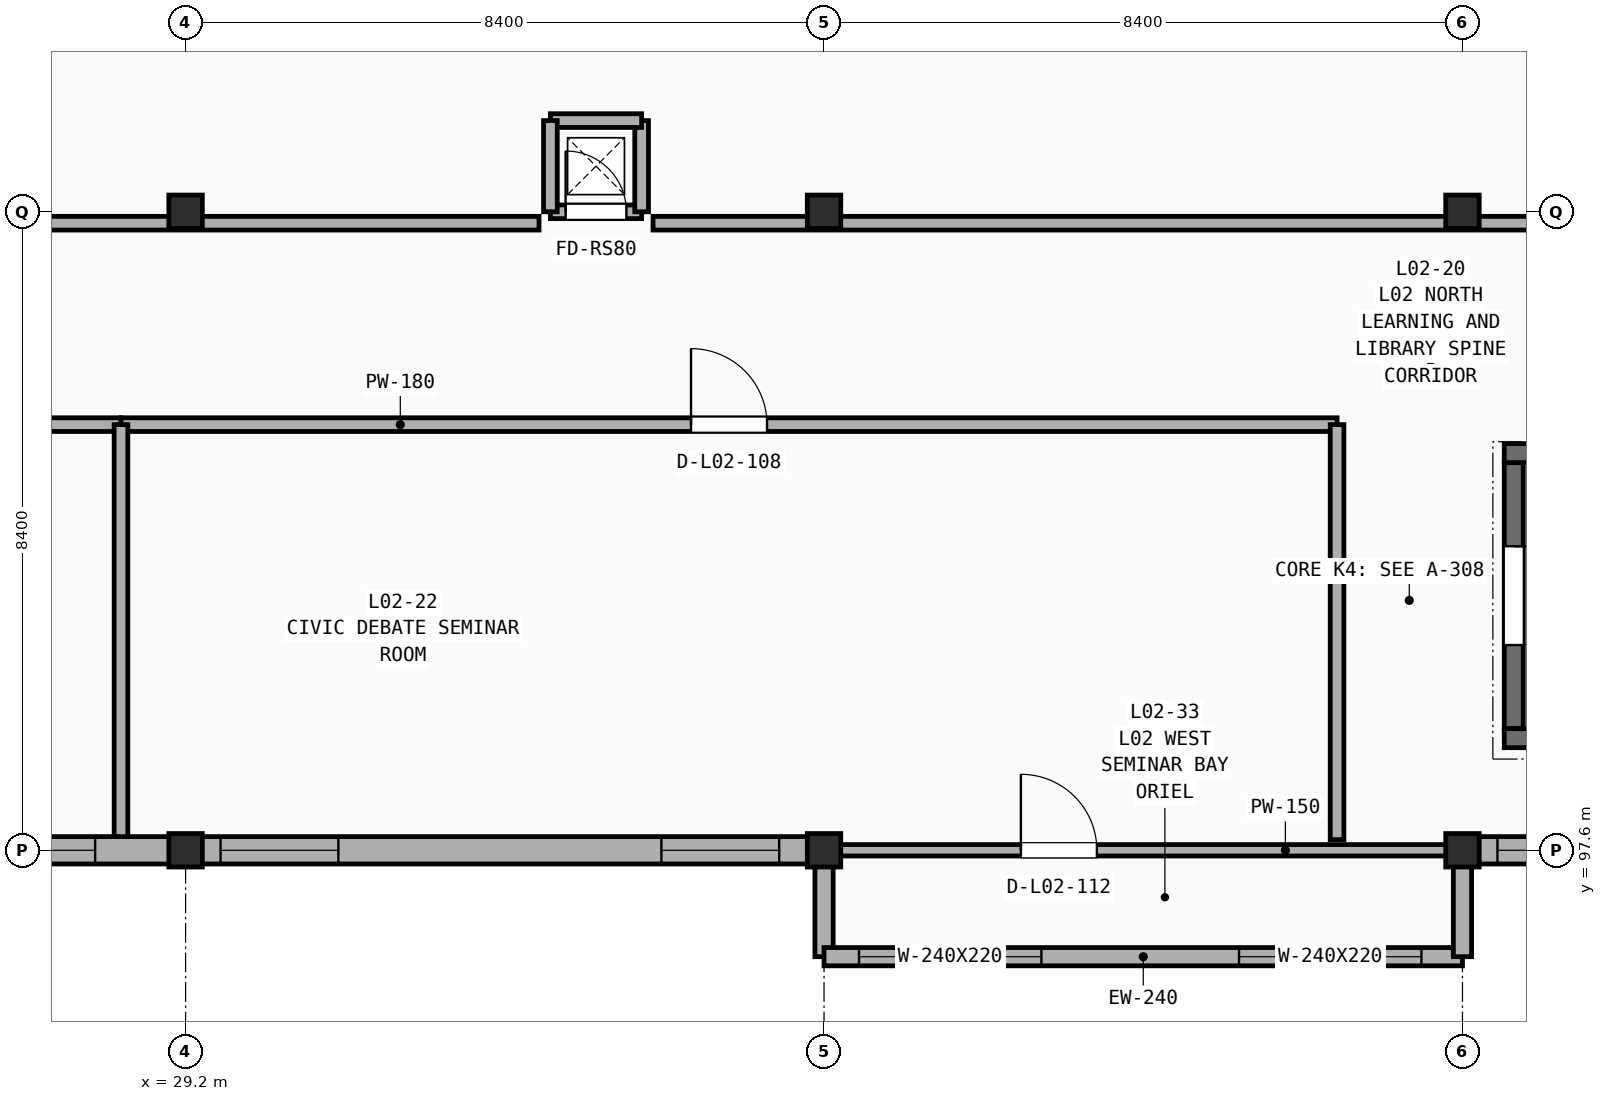
"""IFC4 building model, lengths in metres.
Left out: names, types, materials, properties, quantities, classifications, styles, units other than length and angle.
Written with IfcOpenShell. Run it as: python <this file> out.ifc"""

import sys

from ifc_helpers import new_model, si_unit, direction, frame, frame_2d, origin, origin_2d, place, context, subcontext, project, spatial, rectangle, extrude, element, fill, save


model = new_model("IFC4")
c1 = context("Model", 3, precision=1e-05, world=origin(), true_north=direction((0.0, 1.0)))
c2 = subcontext(c1, "Body", "Model", "MODEL_VIEW")
j1 = project(units=[si_unit("LENGTHUNIT", "METRE"), si_unit("PLANEANGLEUNIT", "RADIAN")], contexts=[c1])
p1 = place(None, origin())
s1 = spatial("IfcSite", under=j1, at=p1, CompositionType="ELEMENT")
p2 = place(p1, origin())
s2 = spatial("IfcBuilding", under=s1, at=p2, CompositionType="ELEMENT")
p3 = place(p2, frame((0.0, 0.0, 9.6)))
s3 = spatial("IfcBuildingStorey", under=s2, at=p3, CompositionType="ELEMENT", Elevation=9.6)
for number, where, z_axis, x_axis in (
    (1, (29.2, 97.6, 0.0), (0.0, 0.0, 1.0), (1.0, 0.0, 0.0)),
    (2, (29.2, 106.0, 0.0), (0.0, 0.0, 1.0), (1.0, 0.0, 0.0)),
    (3, (37.6, 97.6, 0.0), (0.0, 0.0, 1.0), (1.0, 0.0, 0.0)),
    (4, (37.6, 106.0, 0.0), (0.0, 0.0, 1.0), (1.0, 0.0, 0.0)),
    (5, (46.0, 97.6, 0.0), (0.0, 0.0, 1.0), (1.0, 0.0, 0.0)),
    (6, (46.0, 106.0, 0.0), (0.0, 0.0, 1.0), (1.0, 0.0, 0.0)),
):
    element("IfcColumn", number, at=place(p3, frame(where, z_axis=z_axis, x_axis=x_axis)), inside=s3, PredefinedType="COLUMN", context=c2, shape_type="SweptSolid", body=[
        extrude(rectangle(XDim=0.44, YDim=0.44, at=origin_2d()), origin(), (0.0, 0.0, 1.0), 4.2),
    ])
p4 = place(p3, frame((12.54, 103.2, 0.0), z_axis=(0.0, 0.0, 1.0), x_axis=(1.0, 0.0, 0.0)))
e7 = element("IfcWall", 7, at=p4, inside=s3, PredefinedType="PARTITIONING", context=c2, shape_type="SweptSolid", body=[
    extrude(rectangle(XDim=15.81, YDim=0.18, at=frame_2d((7.905, 0.0))), origin(), (0.0, 0.0, 1.0), 3.39),
])
p5 = place(p4, frame((7.405, 0.0, -0.01)))
e8 = element("IfcOpeningElement", 8, at=p5, cuts=e7, PredefinedType="OPENING", context=c2, shape_type="SweptSolid", body=[
    extrude(rectangle(XDim=1.0, YDim=2.16, at=frame_2d((0.5, 1.08))), frame((0.0, 0.1, 0.0), z_axis=(0.0, -1.0, 0.0), x_axis=(1.0, 0.0, 0.0)), (0.0, 0.0, 1.0), 0.2),
])
p6 = place(p3, frame((28.35, 103.2, 0.0), z_axis=(0.0, 0.0, 1.0), x_axis=(1.0, 0.0, 0.0)))
e9 = element("IfcWall", 9, at=p6, inside=s3, PredefinedType="PARTITIONING", context=c2, shape_type="SweptSolid", body=[
    extrude(rectangle(XDim=16.0, YDim=0.18, at=frame_2d((8.0, 0.0))), origin(), (0.0, 0.0, 1.0), 3.45),
])
p7 = place(p6, frame((7.5, 0.0, -0.01)))
e10 = element("IfcOpeningElement", 10, at=p7, cuts=e9, PredefinedType="OPENING", context=c2, shape_type="SweptSolid", body=[
    extrude(rectangle(XDim=1.0, YDim=2.16, at=frame_2d((0.5, 1.08))), frame((0.0, 0.1, 0.0), z_axis=(0.0, -1.0, 0.0), x_axis=(1.0, 0.0, 0.0)), (0.0, 0.0, 1.0), 0.2),
])
p8 = place(p3, frame((28.35, 97.74, 0.0), z_axis=(0.0, 0.0, 1.0), x_axis=(0.0, 1.0, 0.0)))
e11 = element("IfcWall", 11, at=p8, inside=s3, PredefinedType="PARTITIONING", context=c2, shape_type="SweptSolid", body=[
    extrude(rectangle(XDim=5.46, YDim=0.18, at=frame_2d((2.73, 0.0))), origin(), (0.0, 0.0, 1.0), 3.31),
])
p9 = place(p3, frame((44.35, 97.74, 0.0), z_axis=(0.0, 0.0, 1.0), x_axis=(0.0, 1.0, 0.0)))
e12 = element("IfcWall", 12, at=p9, inside=s3, PredefinedType="PARTITIONING", context=c2, shape_type="SweptSolid", body=[
    extrude(rectangle(XDim=5.46, YDim=0.18, at=frame_2d((2.73, 0.0))), origin(), (0.0, 0.0, 1.0), 3.61),
])
p10 = place(p3, frame((37.6, 97.6, 0.0), z_axis=(0.0, 0.0, 1.0), x_axis=(1.0, 0.0, 0.0)))
e13 = element("IfcWall", 13, at=p10, inside=s3, PredefinedType="PARTITIONING", context=c2, shape_type="SweptSolid", body=[
    extrude(rectangle(XDim=8.4, YDim=0.15, at=frame_2d((4.2, 0.0))), origin(), (0.0, 0.0, 1.0), 3.45),
])
p11 = place(p10, frame((2.59, 0.0, -0.01)))
e14 = element("IfcOpeningElement", 14, at=p11, cuts=e13, PredefinedType="OPENING", context=c2, shape_type="SweptSolid", body=[
    extrude(rectangle(XDim=1.0, YDim=2.16, at=frame_2d((0.5, 1.08))), frame((0.0, 0.085, 0.0), z_axis=(0.0, -1.0, 0.0), x_axis=(1.0, 0.0, 0.0)), (0.0, 0.0, 1.0), 0.17),
])
p12 = place(p3, frame((12.54, 105.85, 0.0), z_axis=(0.0, 0.0, 1.0), x_axis=(1.0, 0.0, 0.0)))
e15 = element("IfcWall", 15, at=p12, inside=s3, PredefinedType="PARTITIONING", context=c2, shape_type="SweptSolid", body=[
    extrude(rectangle(XDim=21.31, YDim=0.18, at=frame_2d((10.655, 0.0))), origin(), (0.0, 0.0, 1.0), 3.31),
])
p13 = place(p12, frame((8.87, 0.0, -0.01)))
e16 = element("IfcOpeningElement", 16, at=p13, cuts=e15, PredefinedType="OPENING", context=c2, shape_type="SweptSolid", body=[
    extrude(rectangle(XDim=1.6, YDim=2.21, at=frame_2d((0.8, 1.105))), frame((0.0, 0.1, 0.0), z_axis=(0.0, -1.0, 0.0), x_axis=(1.0, 0.0, 0.0)), (0.0, 0.0, 1.0), 0.2),
])
p14 = place(p3, frame((35.35, 105.85, 0.0), z_axis=(0.0, 0.0, 1.0), x_axis=(1.0, 0.0, 0.0)))
e17 = element("IfcWall", 17, at=p14, inside=s3, PredefinedType="PARTITIONING", context=c2, shape_type="SweptSolid", body=[
    extrude(rectangle(XDim=17.7, YDim=0.18, at=frame_2d((8.85, 0.0))), origin(), (0.0, 0.0, 1.0), 3.25),
])
p15 = place(p3, frame((20.8, 97.6, 0.0), z_axis=(0.0, 0.0, 1.0), x_axis=(1.0, 0.0, 0.0)))
e18 = element("IfcWall", 18, at=p15, inside=s3, PredefinedType="SOLIDWALL", context=c2, shape_type="SweptSolid", body=[
    extrude(rectangle(XDim=8.4, YDim=0.36, at=frame_2d((4.2, 0.0))), origin(), (0.0, 0.0, 1.0), 3.31),
])
p16 = place(p15, frame((0.46, 0.0, 0.75)))
e19 = element("IfcOpeningElement", 19, at=p16, cuts=e18, PredefinedType="OPENING", context=c2, shape_type="SweptSolid", body=[
    extrude(rectangle(XDim=1.55, YDim=2.4, at=frame_2d((0.775, 1.2))), frame((0.0, 0.19, 0.0), z_axis=(0.0, -1.0, 0.0), x_axis=(1.0, 0.0, 0.0)), (0.0, 0.0, 1.0), 0.38),
])
p17 = place(p15, frame((5.66, 0.0, 0.75)))
e20 = element("IfcOpeningElement", 20, at=p17, cuts=e18, PredefinedType="OPENING", context=c2, shape_type="SweptSolid", body=[
    extrude(rectangle(XDim=1.55, YDim=2.4, at=frame_2d((0.775, 1.2))), frame((0.0, 0.19, 0.0), z_axis=(0.0, -1.0, 0.0), x_axis=(1.0, 0.0, 0.0)), (0.0, 0.0, 1.0), 0.38),
])
p18 = place(p3, frame((29.2, 97.6, 0.0), z_axis=(0.0, 0.0, 1.0), x_axis=(1.0, 0.0, 0.0)))
e21 = element("IfcWall", 21, at=p18, inside=s3, PredefinedType="SOLIDWALL", context=c2, shape_type="SweptSolid", body=[
    extrude(rectangle(XDim=8.4, YDim=0.36, at=frame_2d((4.2, 0.0))), origin(), (0.0, 0.0, 1.0), 3.31),
])
p19 = place(p18, frame((0.46, 0.0, 0.75)))
e22 = element("IfcOpeningElement", 22, at=p19, cuts=e21, PredefinedType="OPENING", context=c2, shape_type="SweptSolid", body=[
    extrude(rectangle(XDim=1.55, YDim=2.4, at=frame_2d((0.775, 1.2))), frame((0.0, 0.19, 0.0), z_axis=(0.0, -1.0, 0.0), x_axis=(1.0, 0.0, 0.0)), (0.0, 0.0, 1.0), 0.38),
])
p20 = place(p18, frame((6.26, 0.0, 0.75)))
e23 = element("IfcOpeningElement", 23, at=p20, cuts=e21, PredefinedType="OPENING", context=c2, shape_type="SweptSolid", body=[
    extrude(rectangle(XDim=1.55, YDim=2.4, at=frame_2d((0.775, 1.2))), frame((0.0, 0.19, 0.0), z_axis=(0.0, -1.0, 0.0), x_axis=(1.0, 0.0, 0.0)), (0.0, 0.0, 1.0), 0.38),
])
p21 = place(p3, frame((46.0, 97.6, 0.0), z_axis=(0.0, 0.0, 1.0), x_axis=(1.0, 0.0, 0.0)))
e24 = element("IfcWall", 24, at=p21, inside=s3, PredefinedType="SOLIDWALL", context=c2, shape_type="SweptSolid", body=[
    extrude(rectangle(XDim=4.8, YDim=0.36, at=frame_2d((2.4, 0.0))), origin(), (0.0, 0.0, 1.0), 3.45),
])
p22 = place(p21, frame((0.46, 0.0, 0.75)))
e25 = element("IfcOpeningElement", 25, at=p22, cuts=e24, PredefinedType="OPENING", context=c2, shape_type="SweptSolid", body=[
    extrude(rectangle(XDim=1.55, YDim=2.4, at=frame_2d((0.775, 1.2))), frame((0.0, 0.19, 0.0), z_axis=(0.0, -1.0, 0.0), x_axis=(1.0, 0.0, 0.0)), (0.0, 0.0, 1.0), 0.38),
])
p23 = place(p21, frame((2.66, 0.0, 0.75)))
e26 = element("IfcOpeningElement", 26, at=p23, cuts=e24, PredefinedType="OPENING", context=c2, shape_type="SweptSolid", body=[
    extrude(rectangle(XDim=1.55, YDim=2.4, at=frame_2d((0.775, 1.2))), frame((0.0, 0.19, 0.0), z_axis=(0.0, -1.0, 0.0), x_axis=(1.0, 0.0, 0.0)), (0.0, 0.0, 1.0), 0.38),
])
p24 = place(p3, frame((37.6, 97.45, 0.0), z_axis=(0.0, 0.0, 1.0), x_axis=(0.0, -1.0, 0.0)))
e27 = element("IfcWall", 27, at=p24, inside=s3, PredefinedType="SOLIDWALL", context=c2, shape_type="SweptSolid", body=[
    extrude(rectangle(XDim=1.25, YDim=0.24, at=frame_2d((0.625, 0.0))), origin(), (0.0, 0.0, 1.0), 3.45),
])
p25 = place(p3, frame((37.6, 96.2, 0.0), z_axis=(0.0, 0.0, 1.0), x_axis=(1.0, 0.0, 0.0)))
e28 = element("IfcWall", 28, at=p25, inside=s3, PredefinedType="SOLIDWALL", context=c2, shape_type="SweptSolid", body=[
    extrude(rectangle(XDim=8.4, YDim=0.24, at=frame_2d((4.2, 0.0))), origin(), (0.0, 0.0, 1.0), 3.45),
])
p26 = place(p25, frame((0.46, 0.0, 0.65)))
e29 = element("IfcOpeningElement", 29, at=p26, cuts=e28, PredefinedType="OPENING", context=c2, shape_type="SweptSolid", body=[
    extrude(rectangle(XDim=2.4, YDim=2.2, at=frame_2d((1.2, 1.1))), frame((0.0, 0.13, 0.0), z_axis=(0.0, -1.0, 0.0), x_axis=(1.0, 0.0, 0.0)), (0.0, 0.0, 1.0), 0.26),
])
p27 = place(p25, frame((5.46, 0.0, 0.65)))
e30 = element("IfcOpeningElement", 30, at=p27, cuts=e28, PredefinedType="OPENING", context=c2, shape_type="SweptSolid", body=[
    extrude(rectangle(XDim=2.4, YDim=2.2, at=frame_2d((1.2, 1.1))), frame((0.0, 0.13, 0.0), z_axis=(0.0, -1.0, 0.0), x_axis=(1.0, 0.0, 0.0)), (0.0, 0.0, 1.0), 0.26),
])
p28 = place(p3, frame((46.0, 96.2, 0.0), z_axis=(0.0, 0.0, 1.0), x_axis=(0.0, 1.0, 0.0)))
e31 = element("IfcWall", 31, at=p28, inside=s3, PredefinedType="SOLIDWALL", context=c2, shape_type="SweptSolid", body=[
    extrude(rectangle(XDim=1.25, YDim=0.24, at=frame_2d((0.625, 0.0))), origin(), (0.0, 0.0, 1.0), 3.45),
])
p29 = place(p3, frame((46.675, 102.7, 0.0), z_axis=(0.0, 0.0, 1.0), x_axis=(0.0, -1.0, 0.0)))
e32 = element("IfcWall", 32, at=p29, inside=s3, PredefinedType="SHEAR", context=c2, shape_type="SweptSolid", body=[
    extrude(rectangle(XDim=3.5, YDim=0.25, at=frame_2d((1.75, 0.0))), origin(), (0.0, 0.0, 1.0), 4.2),
])
p30 = place(p29, frame((1.1, 0.0, -0.01)))
e33 = element("IfcOpeningElement", 33, at=p30, cuts=e32, PredefinedType="OPENING", context=c2, shape_type="SweptSolid", body=[
    extrude(rectangle(XDim=1.3, YDim=2.16, at=frame_2d((0.65, 1.08))), frame((0.0, 0.135, 0.0), z_axis=(0.0, -1.0, 0.0), x_axis=(1.0, 0.0, 0.0)), (0.0, 0.0, 1.0), 0.27),
])
for number, where, z_axis, x_axis in (
    (34, (46.55, 99.075, 0.0), (0.0, 0.0, 1.0), (1.0, 0.0, 0.0)),
    (35, (46.55, 102.825, 0.0), (0.0, 0.0, 1.0), (1.0, 0.0, 0.0)),
):
    element("IfcWall", number, at=place(p3, frame(where, z_axis=z_axis, x_axis=x_axis)), inside=s3, PredefinedType="SHEAR", context=c2, shape_type="SweptSolid", body=[
        extrude(rectangle(XDim=8.9, YDim=0.25, at=frame_2d((4.45, 0.0))), origin(), (0.0, 0.0, 1.0), 4.2),
    ])
p31 = place(p3, frame((34.0, 106.0, 0.0), z_axis=(0.0, 0.0, 1.0), x_axis=(1.0, 0.0, 0.0)))
e36 = element("IfcWall", 36, at=p31, inside=s3, PredefinedType="SOLIDWALL", context=c2, shape_type="SweptSolid", body=[
    extrude(rectangle(XDim=1.2, YDim=0.18, at=frame_2d((0.6, 0.0))), origin(), (0.0, 0.0, 1.0), 3.97),
])
p32 = place(p31, frame((0.2, 0.0, -0.01)))
e37 = element("IfcOpeningElement", 37, at=p32, cuts=e36, PredefinedType="OPENING", context=c2, shape_type="SweptSolid", body=[
    extrude(rectangle(XDim=0.8, YDim=2.06, at=frame_2d((0.4, 1.03))), frame((0.0, 0.1, 0.0), z_axis=(0.0, -1.0, 0.0), x_axis=(1.0, 0.0, 0.0)), (0.0, 0.0, 1.0), 0.2),
])
for number, where, z_axis, x_axis in (
    (38, (35.2, 106.0, 0.0), (0.0, 0.0, 1.0), (0.0, 1.0, 0.0)),
    (39, (35.2, 107.2, 0.0), (0.0, 0.0, 1.0), (-1.0, 0.0, 0.0)),
    (40, (34.0, 107.2, 0.0), (0.0, 0.0, 1.0), (0.0, -1.0, 0.0)),
):
    element("IfcWall", number, at=place(p3, frame(where, z_axis=z_axis, x_axis=x_axis)), inside=s3, PredefinedType="SOLIDWALL", context=c2, shape_type="SweptSolid", body=[
        extrude(rectangle(XDim=1.2, YDim=0.18, at=frame_2d((0.6, 0.0))), origin(), (0.0, 0.0, 1.0), 3.97),
    ])
p33 = place(p7, frame((1.0, 0.0, 0.01), z_axis=(0.0, 0.0, 1.0), x_axis=(-1.0, 0.0, 0.0)))
e41 = element("IfcDoor", 41, at=p33, inside=s3, OperationType="SINGLE_SWING_LEFT", PredefinedType="DOOR", context=c2, shape_type="SweptSolid", body=[
    extrude(rectangle(XDim=1.0, YDim=2.15, at=frame_2d((0.5, 1.075))), frame((0.0, 0.025, 0.0), z_axis=(0.0, -1.0, 0.0), x_axis=(1.0, 0.0, 0.0)), (0.0, 0.0, 1.0), 0.05),
])
fill(e10, e41)
p34 = place(p11, frame((0.0, 0.0, 0.01)))
e42 = element("IfcDoor", 42, at=p34, inside=s3, OperationType="SINGLE_SWING_LEFT", PredefinedType="DOOR", context=c2, shape_type="SweptSolid", body=[
    extrude(rectangle(XDim=1.0, YDim=2.15, at=frame_2d((0.5, 1.075))), frame((0.0, 0.025, 0.0), z_axis=(0.0, -1.0, 0.0), x_axis=(1.0, 0.0, 0.0)), (0.0, 0.0, 1.0), 0.05),
])
fill(e14, e42)
p35 = place(p17, origin())
e43 = element("IfcWindow", 43, at=p35, inside=s3, PartitioningType="DOUBLE_PANEL_HORIZONTAL", PredefinedType="WINDOW", context=c2, shape_type="SweptSolid", body=[
    extrude(rectangle(XDim=1.55, YDim=2.4, at=frame_2d((0.775, 1.2))), frame((0.0, 0.03, 0.0), z_axis=(0.0, -1.0, 0.0), x_axis=(1.0, 0.0, 0.0)), (0.0, 0.0, 1.0), 0.06),
])
fill(e20, e43)
p36 = place(p19, origin())
e44 = element("IfcWindow", 44, at=p36, inside=s3, PartitioningType="DOUBLE_PANEL_HORIZONTAL", PredefinedType="WINDOW", context=c2, shape_type="SweptSolid", body=[
    extrude(rectangle(XDim=1.55, YDim=2.4, at=frame_2d((0.775, 1.2))), frame((0.0, 0.03, 0.0), z_axis=(0.0, -1.0, 0.0), x_axis=(1.0, 0.0, 0.0)), (0.0, 0.0, 1.0), 0.06),
])
fill(e22, e44)
p37 = place(p20, origin())
e45 = element("IfcWindow", 45, at=p37, inside=s3, PartitioningType="DOUBLE_PANEL_HORIZONTAL", PredefinedType="WINDOW", context=c2, shape_type="SweptSolid", body=[
    extrude(rectangle(XDim=1.55, YDim=2.4, at=frame_2d((0.775, 1.2))), frame((0.0, 0.03, 0.0), z_axis=(0.0, -1.0, 0.0), x_axis=(1.0, 0.0, 0.0)), (0.0, 0.0, 1.0), 0.06),
])
fill(e23, e45)
p38 = place(p22, origin())
e46 = element("IfcWindow", 46, at=p38, inside=s3, PartitioningType="DOUBLE_PANEL_HORIZONTAL", PredefinedType="WINDOW", context=c2, shape_type="SweptSolid", body=[
    extrude(rectangle(XDim=1.55, YDim=2.4, at=frame_2d((0.775, 1.2))), frame((0.0, 0.03, 0.0), z_axis=(0.0, -1.0, 0.0), x_axis=(1.0, 0.0, 0.0)), (0.0, 0.0, 1.0), 0.06),
])
fill(e25, e46)
p39 = place(p26, origin())
e47 = element("IfcWindow", 47, at=p39, inside=s3, PartitioningType="TRIPLE_PANEL_VERTICAL", PredefinedType="WINDOW", context=c2, shape_type="SweptSolid", body=[
    extrude(rectangle(XDim=2.4, YDim=2.2, at=frame_2d((1.2, 1.1))), frame((0.0, 0.03, 0.0), z_axis=(0.0, -1.0, 0.0), x_axis=(1.0, 0.0, 0.0)), (0.0, 0.0, 1.0), 0.06),
])
fill(e29, e47)
p40 = place(p27, origin())
e48 = element("IfcWindow", 48, at=p40, inside=s3, PartitioningType="TRIPLE_PANEL_VERTICAL", PredefinedType="WINDOW", context=c2, shape_type="SweptSolid", body=[
    extrude(rectangle(XDim=2.4, YDim=2.2, at=frame_2d((1.2, 1.1))), frame((0.0, 0.03, 0.0), z_axis=(0.0, -1.0, 0.0), x_axis=(1.0, 0.0, 0.0)), (0.0, 0.0, 1.0), 0.06),
])
fill(e30, e48)
p41 = place(p30, frame((1.3, 0.0, 0.01), z_axis=(0.0, 0.0, 1.0), x_axis=(-1.0, 0.0, 0.0)))
e49 = element("IfcDoor", 49, at=p41, inside=s3, OperationType="SINGLE_SWING_LEFT", PredefinedType="DOOR", context=c2, shape_type="SweptSolid", body=[
    extrude(rectangle(XDim=1.3, YDim=2.15, at=frame_2d((0.65, 1.075))), frame((0.0, 0.025, 0.0), z_axis=(0.0, -1.0, 0.0), x_axis=(1.0, 0.0, 0.0)), (0.0, 0.0, 1.0), 0.05),
])
fill(e33, e49)
p42 = place(p32, frame((0.0, 0.0, 0.01)))
e50 = element("IfcDoor", 50, at=p42, inside=s3, OperationType="SINGLE_SWING_LEFT", PredefinedType="DOOR", context=c2, shape_type="SweptSolid", body=[
    extrude(rectangle(XDim=0.8, YDim=2.05, at=frame_2d((0.4, 1.025))), frame((0.0, 0.025, 0.0), z_axis=(0.0, -1.0, 0.0), x_axis=(1.0, 0.0, 0.0)), (0.0, 0.0, 1.0), 0.05),
])
fill(e37, e50)
save(model, sys.argv[1])
